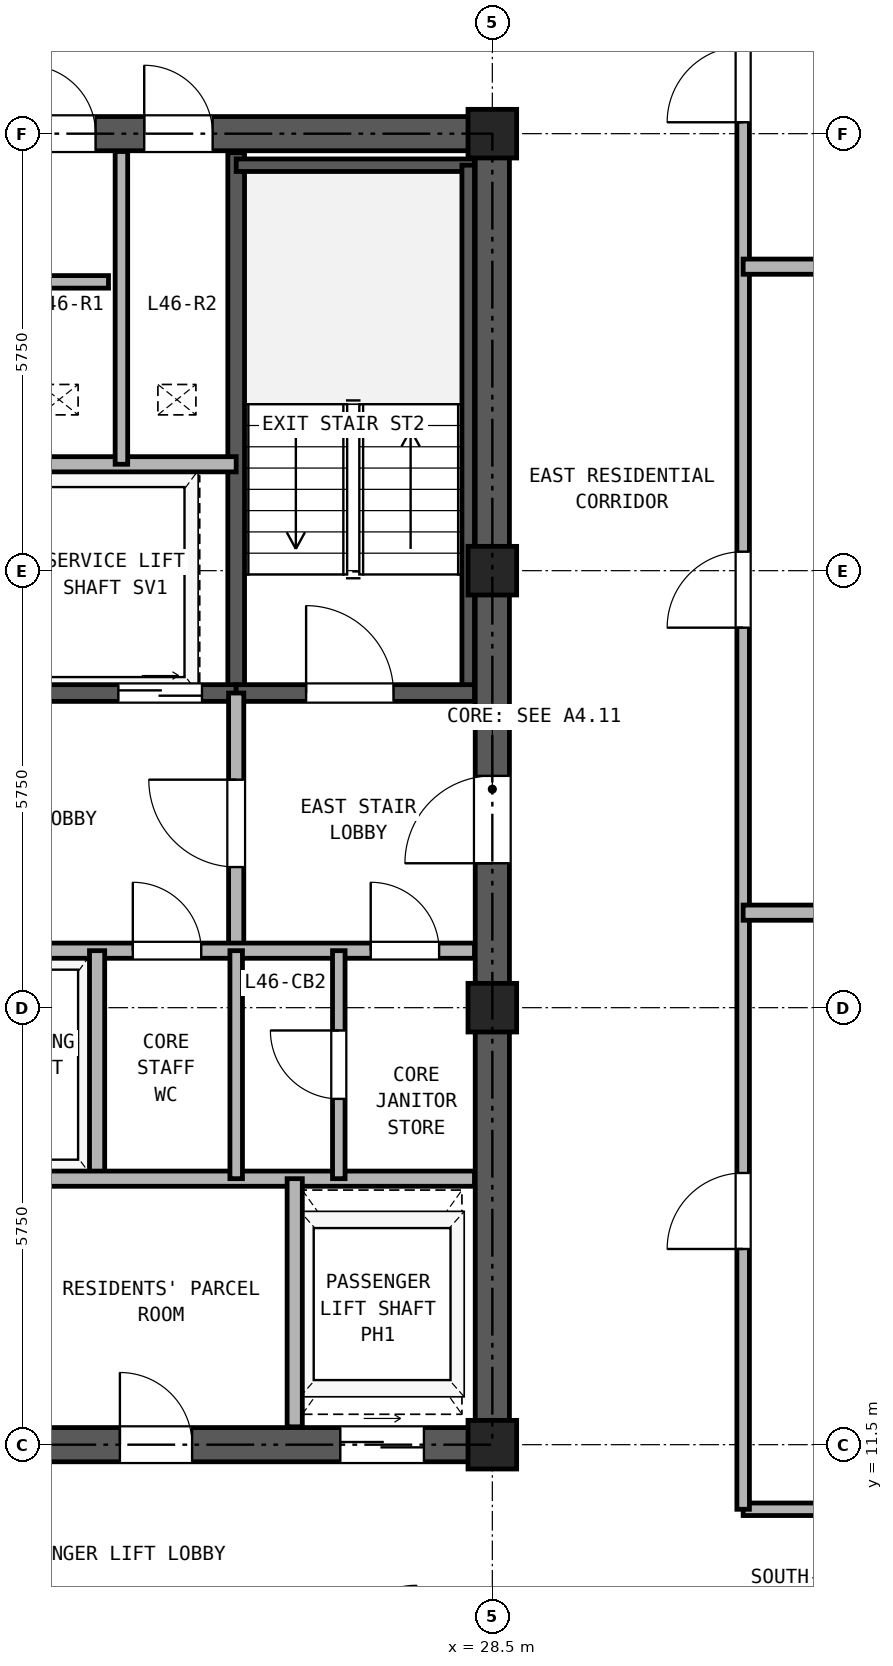
"""IFC4 building model, lengths in metres.
Left out: names, types, materials, properties, quantities, classifications, styles, units other than length and angle.
Written with IfcOpenShell. Run it as: python <this file> out.ifc"""

import sys

from ifc_helpers import new_model, si_unit, direction, frame, frame_2d, origin, origin_2d, place, context, subcontext, project, spatial, rectangle, hollow_rectangle, extrude, source, transform, mapped, element, fill, save


model = new_model("IFC4")
c1 = context("Model", 3, precision=1e-05, world=origin(), true_north=direction((0.0, 1.0)))
c2 = subcontext(c1, "Body", "Model", "MODEL_VIEW")
j1 = project(units=[si_unit("LENGTHUNIT", "METRE"), si_unit("PLANEANGLEUNIT", "RADIAN")], contexts=[c1])
p1 = place(None, origin())
s1 = spatial("IfcSite", under=j1, at=p1, CompositionType="ELEMENT")
p2 = place(p1, origin())
s2 = spatial("IfcBuilding", under=s1, at=p2, CompositionType="ELEMENT")
p3 = place(p2, frame((0.0, 0.0, 165.7)))
s3 = spatial("IfcBuildingStorey", under=s2, at=p3, CompositionType="ELEMENT", Elevation=165.7)
m1 = source(origin(), c2, "Body", "SweptSolid", [
    extrude(hollow_rectangle(XDim=0.64, YDim=0.64, WallThickness=0.035, at=origin_2d()), origin(), (0.0, 0.0, 1.0), 2.95),
])
for number, where, z_axis, x_axis in (
    (1, (28.5, 11.5, 0.0), (0.0, 0.0, 1.0), (1.0, 0.0, 0.0)),
    (2, (28.5, 17.25, 0.0), (0.0, 0.0, 1.0), (1.0, 0.0, 0.0)),
    (3, (28.5, 23.0, 0.0), (0.0, 0.0, 1.0), (1.0, 0.0, 0.0)),
    (4, (28.5, 28.75, 0.0), (0.0, 0.0, 1.0), (1.0, 0.0, 0.0)),
):
    element("IfcColumn", number, at=place(p3, frame(where, z_axis=z_axis, x_axis=x_axis)), inside=s3, PredefinedType="COLUMN", context=c2, shape_type="MappedRepresentation", body=[
        mapped(m1, transform((0.0, 0.0, 0.0), x_axis=(1.0, 0.0, 0.0), y_axis=(0.0, 1.0, 0.0), z_axis=(0.0, 0.0, 1.0), scale=1.0)),
    ])
p4 = place(p3, frame((18.275, 11.5, 0.0), z_axis=(0.0, 0.0, 1.0), x_axis=(1.0, 0.0, 0.0)))
e5 = element("IfcWall", 5, at=p4, inside=s3, PredefinedType="SHEAR", context=c2, shape_type="SweptSolid", body=[
    extrude(rectangle(XDim=10.45, YDim=0.45, at=frame_2d((5.225, 0.0))), origin(), (0.0, 0.0, 1.0), 2.95),
])
p5 = place(p4, frame((1.825, 0.0, 0.0)))
e6 = element("IfcOpeningElement", 6, at=p5, cuts=e5, PredefinedType="OPENING", context=c2, shape_type="SweptSolid", body=[
    extrude(rectangle(XDim=0.95, YDim=2.15, at=frame_2d((0.475, 1.075))), frame((0.0, 0.235, 0.0), z_axis=(0.0, -1.0, 0.0), x_axis=(1.0, 0.0, 0.0)), (0.0, 0.0, 1.0), 0.47),
])
p6 = place(p4, frame((5.325, 0.0, 0.0)))
e7 = element("IfcOpeningElement", 7, at=p6, cuts=e5, PredefinedType="OPENING", context=c2, shape_type="SweptSolid", body=[
    extrude(rectangle(XDim=0.95, YDim=2.15, at=frame_2d((0.475, 1.075))), frame((0.0, 0.235, 0.0), z_axis=(0.0, -1.0, 0.0), x_axis=(1.0, 0.0, 0.0)), (0.0, 0.0, 1.0), 0.47),
])
p7 = place(p4, frame((8.225, 0.0, 0.0)))
e8 = element("IfcOpeningElement", 8, at=p7, cuts=e5, PredefinedType="OPENING", context=c2, shape_type="SweptSolid", body=[
    extrude(rectangle(XDim=1.1, YDim=2.25, at=frame_2d((0.55, 1.125))), frame((0.0, 0.235, 0.0), z_axis=(0.0, -1.0, 0.0), x_axis=(1.0, 0.0, 0.0)), (0.0, 0.0, 1.0), 0.47),
])
p8 = place(p3, frame((18.275, 28.75, 0.0), z_axis=(0.0, 0.0, 1.0), x_axis=(1.0, 0.0, 0.0)))
e9 = element("IfcWall", 9, at=p8, inside=s3, PredefinedType="SHEAR", context=c2, shape_type="SweptSolid", body=[
    extrude(rectangle(XDim=10.45, YDim=0.45, at=frame_2d((5.225, 0.0))), origin(), (0.0, 0.0, 1.0), 2.95),
])
p9 = place(p8, frame((4.105, 0.0, 0.0)))
e10 = element("IfcOpeningElement", 10, at=p9, cuts=e9, PredefinedType="OPENING", context=c2, shape_type="SweptSolid", body=[
    extrude(rectangle(XDim=0.9, YDim=2.05, at=frame_2d((0.45, 1.025))), frame((0.0, 0.235, 0.0), z_axis=(0.0, -1.0, 0.0), x_axis=(1.0, 0.0, 0.0)), (0.0, 0.0, 1.0), 0.47),
])
p10 = place(p8, frame((5.645, 0.0, 0.0)))
e11 = element("IfcOpeningElement", 11, at=p10, cuts=e9, PredefinedType="OPENING", context=c2, shape_type="SweptSolid", body=[
    extrude(rectangle(XDim=0.9, YDim=2.05, at=frame_2d((0.45, 1.025))), frame((0.0, 0.235, 0.0), z_axis=(0.0, -1.0, 0.0), x_axis=(1.0, 0.0, 0.0)), (0.0, 0.0, 1.0), 0.47),
])
p11 = place(p3, frame((28.5, 11.725, 0.0), z_axis=(0.0, 0.0, 1.0), x_axis=(0.0, 1.0, 0.0)))
e12 = element("IfcWall", 12, at=p11, inside=s3, PredefinedType="SHEAR", context=c2, shape_type="SweptSolid", body=[
    extrude(rectangle(XDim=16.8, YDim=0.45, at=frame_2d((8.4, 0.0))), origin(), (0.0, 0.0, 1.0), 2.95),
])
p12 = place(p11, frame((7.425, 0.0, 0.0)))
e13 = element("IfcOpeningElement", 13, at=p12, cuts=e12, PredefinedType="OPENING", context=c2, shape_type="SweptSolid", body=[
    extrude(rectangle(XDim=1.15, YDim=2.2, at=frame_2d((0.575, 1.1))), frame((0.0, 0.235, 0.0), z_axis=(0.0, -1.0, 0.0), x_axis=(1.0, 0.0, 0.0)), (0.0, 0.0, 1.0), 0.47),
])
p13 = place(p3, frame((25.13, 21.39, 0.0), z_axis=(0.0, 0.0, 1.0), x_axis=(0.0, 1.0, 0.0)))
e14 = element("IfcWall", 14, at=p13, inside=s3, PredefinedType="SOLIDWALL", context=c2, shape_type="SweptSolid", body=[
    extrude(rectangle(XDim=7.11, YDim=0.22, at=frame_2d((3.555, 0.0))), origin(), (0.0, 0.0, 1.0), 2.95),
])
p14 = place(p3, frame((25.13, 28.335, 0.0), z_axis=(0.0, 0.0, 1.0), x_axis=(1.0, 0.0, 0.0)))
e15 = element("IfcWall", 15, at=p14, inside=s3, PredefinedType="PARTITIONING", context=c2, shape_type="SweptSolid", body=[
    extrude(rectangle(XDim=3.135, YDim=0.165, at=frame_2d((1.567, 0.0))), origin(), (0.0, 0.0, 1.0), 2.95),
])
p15 = place(p3, frame((28.183, 21.39, 0.0), z_axis=(0.0, 0.0, 1.0), x_axis=(0.0, 1.0, 0.0)))
e16 = element("IfcWall", 16, at=p15, inside=s3, PredefinedType="PARTITIONING", context=c2, shape_type="SweptSolid", body=[
    extrude(rectangle(XDim=6.945, YDim=0.165, at=frame_2d((3.473, 0.0))), origin(), (0.0, 0.0, 1.0), 2.95),
])
p16 = place(p3, frame((18.735, 21.39, 0.0), z_axis=(0.0, 0.0, 1.0), x_axis=(1.0, 0.0, 0.0)))
e17 = element("IfcWall", 17, at=p16, inside=s3, PredefinedType="SOLIDWALL", context=c2, shape_type="SweptSolid", body=[
    extrude(rectangle(XDim=6.395, YDim=0.22, at=frame_2d((3.197, 0.0))), origin(), (0.0, 0.0, 1.0), 2.95),
])
p17 = place(p16, frame((1.115, 0.0, 0.0)))
e18 = element("IfcOpeningElement", 18, at=p17, cuts=e17, PredefinedType="OPENING", context=c2, shape_type="SweptSolid", body=[
    extrude(rectangle(XDim=1.15, YDim=2.2, at=frame_2d((0.575, 1.1))), frame((0.0, 0.12, 0.0), z_axis=(0.0, -1.0, 0.0), x_axis=(1.0, 0.0, 0.0)), (0.0, 0.0, 1.0), 0.24),
])
p18 = place(p16, frame((4.845, 0.0, 0.0)))
e19 = element("IfcOpeningElement", 19, at=p18, cuts=e17, PredefinedType="OPENING", context=c2, shape_type="SweptSolid", body=[
    extrude(rectangle(XDim=1.1, YDim=2.25, at=frame_2d((0.55, 1.125))), frame((0.0, 0.12, 0.0), z_axis=(0.0, -1.0, 0.0), x_axis=(1.0, 0.0, 0.0)), (0.0, 0.0, 1.0), 0.24),
])
p19 = place(p3, frame((25.13, 21.39, 0.0), z_axis=(0.0, 0.0, 1.0), x_axis=(1.0, 0.0, 0.0)))
e20 = element("IfcWall", 20, at=p19, inside=s3, PredefinedType="SOLIDWALL", context=c2, shape_type="SweptSolid", body=[
    extrude(rectangle(XDim=3.135, YDim=0.22, at=frame_2d((1.567, 0.0))), origin(), (0.0, 0.0, 1.0), 2.95),
])
p20 = place(p19, frame((0.92, 0.0, 0.0)))
e21 = element("IfcOpeningElement", 21, at=p20, cuts=e20, PredefinedType="OPENING", context=c2, shape_type="SweptSolid", body=[
    extrude(rectangle(XDim=1.15, YDim=2.2, at=frame_2d((0.575, 1.1))), frame((0.0, 0.12, 0.0), z_axis=(0.0, -1.0, 0.0), x_axis=(1.0, 0.0, 0.0)), (0.0, 0.0, 1.0), 0.24),
])
p21 = place(p3, frame((22.11, 24.4, 0.0), z_axis=(0.0, 0.0, 1.0), x_axis=(1.0, 0.0, 0.0)))
e22 = element("IfcWall", 22, at=p21, inside=s3, PredefinedType="PARTITIONING", context=c2, shape_type="SweptSolid", body=[
    extrude(rectangle(XDim=3.02, YDim=0.2, at=frame_2d((1.51, 0.0))), origin(), (0.0, 0.0, 1.0), 2.95),
])
p22 = place(p3, frame((23.62, 24.4, 0.0), z_axis=(0.0, 0.0, 1.0), x_axis=(0.0, 1.0, 0.0)))
e23 = element("IfcWall", 23, at=p22, inside=s3, PredefinedType="PARTITIONING", context=c2, shape_type="SweptSolid", body=[
    extrude(rectangle(XDim=4.115, YDim=0.165, at=frame_2d((2.058, 0.0))), origin(), (0.0, 0.0, 1.0), 2.95),
])
p23 = place(p3, frame((25.13, 18.0, 0.0), z_axis=(0.0, 0.0, 1.0), x_axis=(0.0, 1.0, 0.0)))
e24 = element("IfcWall", 24, at=p23, inside=s3, PredefinedType="PARTITIONING", context=c2, shape_type="SweptSolid", body=[
    extrude(rectangle(XDim=3.39, YDim=0.2, at=frame_2d((1.695, 0.0))), origin(), (0.0, 0.0, 1.0), 2.95),
])
p24 = place(p23, frame((1.1, 0.0, 0.0)))
e25 = element("IfcOpeningElement", 25, at=p24, cuts=e24, PredefinedType="OPENING", context=c2, shape_type="SweptSolid", body=[
    extrude(rectangle(XDim=1.15, YDim=2.2, at=frame_2d((0.575, 1.1))), frame((0.0, 0.11, 0.0), z_axis=(0.0, -1.0, 0.0), x_axis=(1.0, 0.0, 0.0)), (0.0, 0.0, 1.0), 0.22),
])
p25 = place(p3, frame((18.735, 18.0, 0.0), z_axis=(0.0, 0.0, 1.0), x_axis=(1.0, 0.0, 0.0)))
e26 = element("IfcWall", 26, at=p25, inside=s3, PredefinedType="PARTITIONING", context=c2, shape_type="SweptSolid", body=[
    extrude(rectangle(XDim=9.53, YDim=0.2, at=frame_2d((4.765, 0.0))), origin(), (0.0, 0.0, 1.0), 2.95),
])
p26 = place(p25, frame((0.515, 0.0, 0.0)))
e27 = element("IfcOpeningElement", 27, at=p26, cuts=e26, PredefinedType="OPENING", context=c2, shape_type="SweptSolid", body=[
    extrude(rectangle(XDim=1.3, YDim=2.3, at=frame_2d((0.65, 1.15))), frame((0.0, 0.11, 0.0), z_axis=(0.0, -1.0, 0.0), x_axis=(1.0, 0.0, 0.0)), (0.0, 0.0, 1.0), 0.22),
])
p27 = place(p25, frame((2.615, 0.0, 0.0)))
e28 = element("IfcOpeningElement", 28, at=p27, cuts=e26, PredefinedType="OPENING", context=c2, shape_type="SweptSolid", body=[
    extrude(rectangle(XDim=1.3, YDim=2.3, at=frame_2d((0.65, 1.15))), frame((0.0, 0.11, 0.0), z_axis=(0.0, -1.0, 0.0), x_axis=(1.0, 0.0, 0.0)), (0.0, 0.0, 1.0), 0.22),
])
p28 = place(p25, frame((5.035, 0.0, 0.0)))
e29 = element("IfcOpeningElement", 29, at=p28, cuts=e26, PredefinedType="OPENING", context=c2, shape_type="SweptSolid", body=[
    extrude(rectangle(XDim=0.9, YDim=2.05, at=frame_2d((0.45, 1.025))), frame((0.0, 0.11, 0.0), z_axis=(0.0, -1.0, 0.0), x_axis=(1.0, 0.0, 0.0)), (0.0, 0.0, 1.0), 0.22),
])
p29 = place(p25, frame((8.165, 0.0, 0.0)))
e30 = element("IfcOpeningElement", 30, at=p29, cuts=e26, PredefinedType="OPENING", context=c2, shape_type="SweptSolid", body=[
    extrude(rectangle(XDim=0.9, YDim=2.05, at=frame_2d((0.45, 1.025))), frame((0.0, 0.11, 0.0), z_axis=(0.0, -1.0, 0.0), x_axis=(1.0, 0.0, 0.0)), (0.0, 0.0, 1.0), 0.22),
])
p30 = place(p3, frame((23.3, 15.0, 0.0), z_axis=(0.0, 0.0, 1.0), x_axis=(0.0, 1.0, 0.0)))
e31 = element("IfcWall", 31, at=p30, inside=s3, PredefinedType="PARTITIONING", context=c2, shape_type="SweptSolid", body=[
    extrude(rectangle(XDim=3.0, YDim=0.2, at=frame_2d((1.5, 0.0))), origin(), (0.0, 0.0, 1.0), 2.95),
])
p31 = place(p3, frame((18.735, 15.0, 0.0), z_axis=(0.0, 0.0, 1.0), x_axis=(1.0, 0.0, 0.0)))
e32 = element("IfcWall", 32, at=p31, inside=s3, PredefinedType="PARTITIONING", context=c2, shape_type="SweptSolid", body=[
    extrude(rectangle(XDim=9.53, YDim=0.2, at=frame_2d((4.765, 0.0))), origin(), (0.0, 0.0, 1.0), 2.95),
])
p32 = place(p3, frame((25.13, 15.0, 0.0), z_axis=(0.0, 0.0, 1.0), x_axis=(0.0, 1.0, 0.0)))
e33 = element("IfcWall", 33, at=p32, inside=s3, PredefinedType="PARTITIONING", context=c2, shape_type="SweptSolid", body=[
    extrude(rectangle(XDim=3.0, YDim=0.165, at=frame_2d((1.5, 0.0))), origin(), (0.0, 0.0, 1.0), 2.95),
])
p33 = place(p3, frame((26.48, 15.0, 0.0), z_axis=(0.0, 0.0, 1.0), x_axis=(0.0, 1.0, 0.0)))
e34 = element("IfcWall", 34, at=p33, inside=s3, PredefinedType="PARTITIONING", context=c2, shape_type="SweptSolid", body=[
    extrude(rectangle(XDim=3.0, YDim=0.165, at=frame_2d((1.5, 0.0))), origin(), (0.0, 0.0, 1.0), 2.95),
])
p34 = place(p33, frame((1.05, 0.0, 0.0)))
e35 = element("IfcOpeningElement", 35, at=p34, cuts=e34, PredefinedType="OPENING", context=c2, shape_type="SweptSolid", body=[
    extrude(rectangle(XDim=0.9, YDim=2.05, at=frame_2d((0.45, 1.025))), frame((0.0, 0.093, 0.0), z_axis=(0.0, -1.0, 0.0), x_axis=(1.0, 0.0, 0.0)), (0.0, 0.0, 1.0), 0.185),
])
p35 = place(p3, frame((25.9, 11.735, 0.0), z_axis=(0.0, 0.0, 1.0), x_axis=(0.0, 1.0, 0.0)))
e36 = element("IfcWall", 36, at=p35, inside=s3, PredefinedType="PARTITIONING", context=c2, shape_type="SweptSolid", body=[
    extrude(rectangle(XDim=3.265, YDim=0.2, at=frame_2d((1.632, 0.0))), origin(), (0.0, 0.0, 1.0), 2.95),
])
p36 = place(p3, frame((31.8, 10.65, 0.0), z_axis=(0.0, 0.0, 1.0), x_axis=(1.0, 0.0, 0.0)))
e37 = element("IfcWall", 37, at=p36, inside=s3, PredefinedType="PARTITIONING", context=c2, shape_type="SweptSolid", body=[
    extrude(rectangle(XDim=6.4, YDim=0.165, at=frame_2d((3.2, 0.0))), origin(), (0.0, 0.0, 1.0), 2.95),
])
p37 = place(p3, frame((31.8, 10.65, 0.0), z_axis=(0.0, 0.0, 1.0), x_axis=(0.0, 1.0, 0.0)))
e38 = element("IfcWall", 38, at=p37, inside=s3, PredefinedType="PARTITIONING", context=c2, shape_type="SweptSolid", body=[
    extrude(rectangle(XDim=24.49, YDim=0.165, at=frame_2d((12.245, 0.0))), origin(), (0.0, 0.0, 1.0), 2.95),
])
p38 = place(p37, frame((3.425, 0.0, 0.0)))
e39 = element("IfcOpeningElement", 39, at=p38, cuts=e38, PredefinedType="OPENING", context=c2, shape_type="SweptSolid", body=[
    extrude(rectangle(XDim=1.0, YDim=2.15, at=frame_2d((0.5, 1.075))), frame((0.0, 0.093, 0.0), z_axis=(0.0, -1.0, 0.0), x_axis=(1.0, 0.0, 0.0)), (0.0, 0.0, 1.0), 0.185),
])
p39 = place(p37, frame((11.6, 0.0, 0.0)))
e40 = element("IfcOpeningElement", 40, at=p39, cuts=e38, PredefinedType="OPENING", context=c2, shape_type="SweptSolid", body=[
    extrude(rectangle(XDim=1.0, YDim=2.15, at=frame_2d((0.5, 1.075))), frame((0.0, 0.093, 0.0), z_axis=(0.0, -1.0, 0.0), x_axis=(1.0, 0.0, 0.0)), (0.0, 0.0, 1.0), 0.185),
])
p40 = place(p37, frame((18.25, 0.0, 0.0)))
e41 = element("IfcOpeningElement", 41, at=p40, cuts=e38, PredefinedType="OPENING", context=c2, shape_type="SweptSolid", body=[
    extrude(rectangle(XDim=1.0, YDim=2.15, at=frame_2d((0.5, 1.075))), frame((0.0, 0.093, 0.0), z_axis=(0.0, -1.0, 0.0), x_axis=(1.0, 0.0, 0.0)), (0.0, 0.0, 1.0), 0.185),
])
for number, where, z_axis, x_axis in (
    (42, (31.8, 18.5, 0.0), (0.0, 0.0, 1.0), (1.0, 0.0, 0.0)),
    (43, (31.8, 27.0, 0.0), (0.0, 0.0, 1.0), (1.0, 0.0, 0.0)),
):
    element("IfcWall", number, at=place(p3, frame(where, z_axis=z_axis, x_axis=x_axis)), inside=s3, PredefinedType="PARTITIONING", context=c2, shape_type="SweptSolid", body=[
        extrude(rectangle(XDim=9.84, YDim=0.2, at=frame_2d((4.92, 0.0))), origin(), (0.0, 0.0, 1.0), 2.95),
    ])
p41 = place(p3, frame((22.35, 26.8, 0.0), z_axis=(0.0, 0.0, 1.0), x_axis=(1.0, 0.0, 0.0)))
e44 = element("IfcWall", 44, at=p41, inside=s3, PredefinedType="PARTITIONING", context=c2, shape_type="SweptSolid", body=[
    extrude(rectangle(XDim=1.1, YDim=0.165, at=frame_2d((0.55, 0.0))), origin(), (0.0, 0.0, 1.0), 2.95),
])
p42 = place(p20, frame((1.15, 0.0, 0.0), z_axis=(0.0, 0.0, 1.0), x_axis=(-1.0, 0.0, 0.0)))
e45 = element("IfcDoor", 45, at=p42, inside=s3, OperationType="SINGLE_SWING_LEFT", PredefinedType="DOOR", context=c2, shape_type="SweptSolid", body=[
    extrude(rectangle(XDim=1.15, YDim=2.2, at=frame_2d((0.575, 1.1))), frame((0.0, 0.025, 0.0), z_axis=(0.0, -1.0, 0.0), x_axis=(1.0, 0.0, 0.0)), (0.0, 0.0, 1.0), 0.05),
])
fill(e21, e45)
p43 = place(p18, frame((1.1, 0.0, 0.0), z_axis=(0.0, 0.0, 1.0), x_axis=(-1.0, 0.0, 0.0)))
e46 = element("IfcDoor", 46, at=p43, inside=s3, OperationType="DOUBLE_DOOR_SLIDING", PredefinedType="DOOR", context=c2, shape_type="SweptSolid", body=[
    extrude(rectangle(XDim=1.1, YDim=2.25, at=frame_2d((0.55, 1.125))), frame((0.0, 0.025, 0.0), z_axis=(0.0, -1.0, 0.0), x_axis=(1.0, 0.0, 0.0)), (0.0, 0.0, 1.0), 0.05),
])
fill(e19, e46)
p44 = place(p24, origin())
e47 = element("IfcDoor", 47, at=p44, inside=s3, OperationType="SINGLE_SWING_RIGHT", PredefinedType="DOOR", context=c2, shape_type="SweptSolid", body=[
    extrude(rectangle(XDim=1.15, YDim=2.2, at=frame_2d((0.575, 1.1))), frame((0.0, 0.025, 0.0), z_axis=(0.0, -1.0, 0.0), x_axis=(1.0, 0.0, 0.0)), (0.0, 0.0, 1.0), 0.05),
])
fill(e25, e47)
p45 = place(p28, frame((0.9, 0.0, 0.0), z_axis=(0.0, 0.0, 1.0), x_axis=(-1.0, 0.0, 0.0)))
e48 = element("IfcDoor", 48, at=p45, inside=s3, OperationType="SINGLE_SWING_LEFT", PredefinedType="DOOR", context=c2, shape_type="SweptSolid", body=[
    extrude(rectangle(XDim=0.9, YDim=2.05, at=frame_2d((0.45, 1.025))), frame((0.0, 0.025, 0.0), z_axis=(0.0, -1.0, 0.0), x_axis=(1.0, 0.0, 0.0)), (0.0, 0.0, 1.0), 0.05),
])
fill(e29, e48)
p46 = place(p34, origin())
e49 = element("IfcDoor", 49, at=p46, inside=s3, OperationType="SINGLE_SWING_RIGHT", PredefinedType="DOOR", context=c2, shape_type="SweptSolid", body=[
    extrude(rectangle(XDim=0.9, YDim=2.05, at=frame_2d((0.45, 1.025))), frame((0.0, 0.025, 0.0), z_axis=(0.0, -1.0, 0.0), x_axis=(1.0, 0.0, 0.0)), (0.0, 0.0, 1.0), 0.05),
])
fill(e35, e49)
p47 = place(p29, frame((0.9, 0.0, 0.0), z_axis=(0.0, 0.0, 1.0), x_axis=(-1.0, 0.0, 0.0)))
e50 = element("IfcDoor", 50, at=p47, inside=s3, OperationType="SINGLE_SWING_LEFT", PredefinedType="DOOR", context=c2, shape_type="SweptSolid", body=[
    extrude(rectangle(XDim=0.9, YDim=2.05, at=frame_2d((0.45, 1.025))), frame((0.0, 0.025, 0.0), z_axis=(0.0, -1.0, 0.0), x_axis=(1.0, 0.0, 0.0)), (0.0, 0.0, 1.0), 0.05),
])
fill(e30, e50)
p48 = place(p12, origin())
e51 = element("IfcDoor", 51, at=p48, inside=s3, OperationType="SINGLE_SWING_LEFT", PredefinedType="DOOR", context=c2, shape_type="SweptSolid", body=[
    extrude(rectangle(XDim=1.15, YDim=2.2, at=frame_2d((0.575, 1.1))), frame((0.0, 0.025, 0.0), z_axis=(0.0, -1.0, 0.0), x_axis=(1.0, 0.0, 0.0)), (0.0, 0.0, 1.0), 0.05),
])
fill(e13, e51)
p49 = place(p9, origin())
e52 = element("IfcDoor", 52, at=p49, inside=s3, OperationType="SINGLE_SWING_LEFT", PredefinedType="DOOR", context=c2, shape_type="SweptSolid", body=[
    extrude(rectangle(XDim=0.9, YDim=2.05, at=frame_2d((0.45, 1.025))), frame((0.0, 0.025, 0.0), z_axis=(0.0, -1.0, 0.0), x_axis=(1.0, 0.0, 0.0)), (0.0, 0.0, 1.0), 0.05),
])
fill(e10, e52)
p50 = place(p10, origin())
e53 = element("IfcDoor", 53, at=p50, inside=s3, OperationType="SINGLE_SWING_LEFT", PredefinedType="DOOR", context=c2, shape_type="SweptSolid", body=[
    extrude(rectangle(XDim=0.9, YDim=2.05, at=frame_2d((0.45, 1.025))), frame((0.0, 0.025, 0.0), z_axis=(0.0, -1.0, 0.0), x_axis=(1.0, 0.0, 0.0)), (0.0, 0.0, 1.0), 0.05),
])
fill(e11, e53)
p51 = place(p6, frame((0.95, 0.0, 0.0), z_axis=(0.0, 0.0, 1.0), x_axis=(-1.0, 0.0, 0.0)))
e54 = element("IfcDoor", 54, at=p51, inside=s3, OperationType="SINGLE_SWING_LEFT", PredefinedType="DOOR", context=c2, shape_type="SweptSolid", body=[
    extrude(rectangle(XDim=0.95, YDim=2.15, at=frame_2d((0.475, 1.075))), frame((0.0, 0.025, 0.0), z_axis=(0.0, -1.0, 0.0), x_axis=(1.0, 0.0, 0.0)), (0.0, 0.0, 1.0), 0.05),
])
fill(e7, e54)
p52 = place(p7, frame((1.1, 0.0, 0.0), z_axis=(0.0, 0.0, 1.0), x_axis=(-1.0, 0.0, 0.0)))
e55 = element("IfcDoor", 55, at=p52, inside=s3, OperationType="DOUBLE_DOOR_SLIDING", PredefinedType="DOOR", context=c2, shape_type="SweptSolid", body=[
    extrude(rectangle(XDim=1.1, YDim=2.25, at=frame_2d((0.55, 1.125))), frame((0.0, 0.025, 0.0), z_axis=(0.0, -1.0, 0.0), x_axis=(1.0, 0.0, 0.0)), (0.0, 0.0, 1.0), 0.05),
])
fill(e8, e55)
p53 = place(p38, frame((1.0, 0.0, 0.0), z_axis=(0.0, 0.0, 1.0), x_axis=(-1.0, 0.0, 0.0)))
e56 = element("IfcDoor", 56, at=p53, inside=s3, OperationType="SINGLE_SWING_LEFT", PredefinedType="DOOR", context=c2, shape_type="SweptSolid", body=[
    extrude(rectangle(XDim=1.0, YDim=2.15, at=frame_2d((0.5, 1.075))), frame((0.0, 0.025, 0.0), z_axis=(0.0, -1.0, 0.0), x_axis=(1.0, 0.0, 0.0)), (0.0, 0.0, 1.0), 0.05),
])
fill(e39, e56)
p54 = place(p39, frame((1.0, 0.0, 0.0), z_axis=(0.0, 0.0, 1.0), x_axis=(-1.0, 0.0, 0.0)))
e57 = element("IfcDoor", 57, at=p54, inside=s3, OperationType="SINGLE_SWING_LEFT", PredefinedType="DOOR", context=c2, shape_type="SweptSolid", body=[
    extrude(rectangle(XDim=1.0, YDim=2.15, at=frame_2d((0.5, 1.075))), frame((0.0, 0.025, 0.0), z_axis=(0.0, -1.0, 0.0), x_axis=(1.0, 0.0, 0.0)), (0.0, 0.0, 1.0), 0.05),
])
fill(e40, e57)
p55 = place(p40, frame((1.0, 0.0, 0.0), z_axis=(0.0, 0.0, 1.0), x_axis=(-1.0, 0.0, 0.0)))
e58 = element("IfcDoor", 58, at=p55, inside=s3, OperationType="SINGLE_SWING_LEFT", PredefinedType="DOOR", context=c2, shape_type="SweptSolid", body=[
    extrude(rectangle(XDim=1.0, YDim=2.15, at=frame_2d((0.5, 1.075))), frame((0.0, 0.025, 0.0), z_axis=(0.0, -1.0, 0.0), x_axis=(1.0, 0.0, 0.0)), (0.0, 0.0, 1.0), 0.05),
])
fill(e41, e58)
save(model, sys.argv[1])
